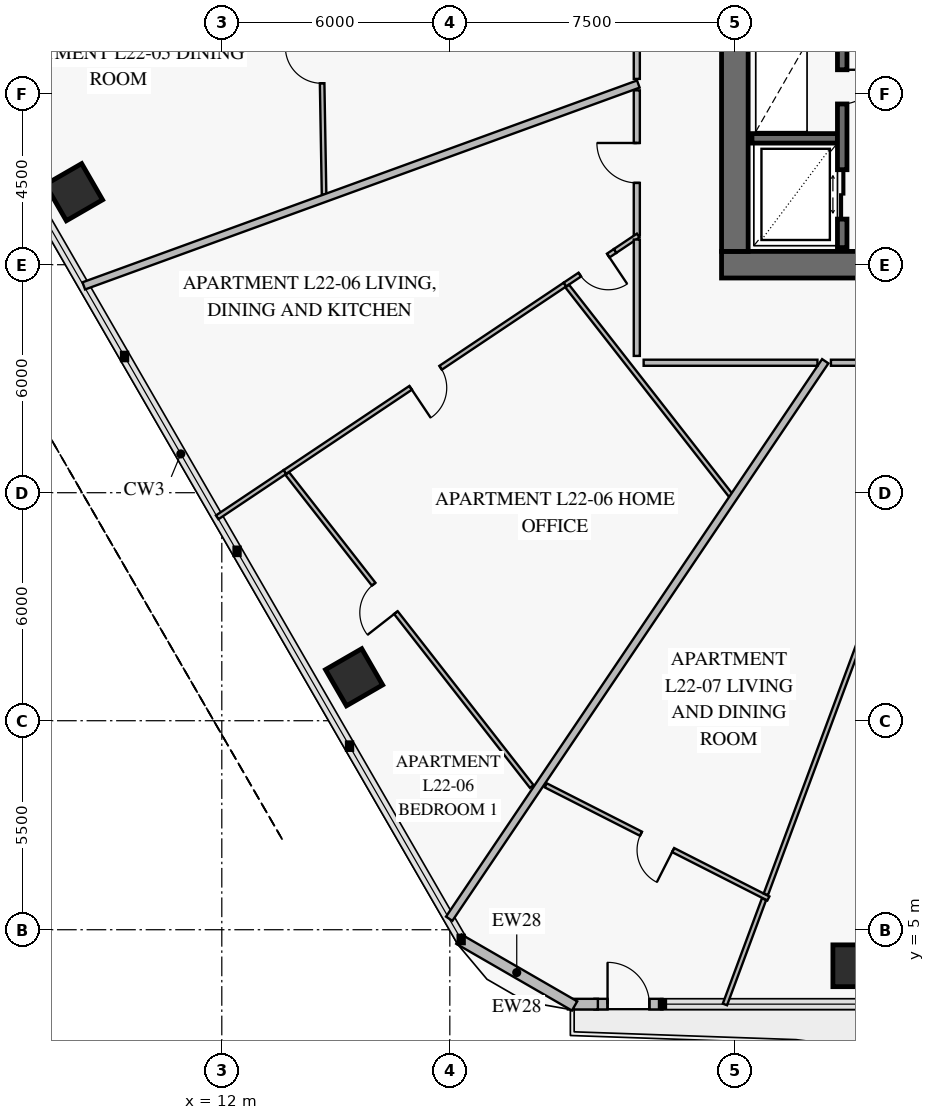
"""IFC4 building model, lengths in metres.
Left out: names, types, materials, properties, quantities, classifications, styles, units other than length and angle.
Written with IfcOpenShell. Run it as: python <this file> out.ifc"""

import sys

from ifc_helpers import new_model, si_unit, direction, frame, frame_2d, origin, origin_2d, place, context, subcontext, project, spatial, rectangle, extrude, element, fill, save


model = new_model("IFC4")
c1 = context("Model", 3, precision=1e-05, world=origin(), true_north=direction((0.0, 1.0)))
c2 = subcontext(c1, "Body", "Model", "MODEL_VIEW")
j1 = project(units=[si_unit("LENGTHUNIT", "METRE"), si_unit("PLANEANGLEUNIT", "RADIAN")], contexts=[c1])
p1 = place(None, origin())
s1 = spatial("IfcSite", under=j1, at=p1, CompositionType="ELEMENT")
p2 = place(p1, origin())
s2 = spatial("IfcBuilding", under=s1, at=p2, CompositionType="ELEMENT")
p3 = place(p2, frame((0.0, 0.0, 92.4)))
s3 = spatial("IfcBuildingStorey", under=s2, at=p3, CompositionType="ELEMENT", Elevation=92.4)
p4 = place(p3, frame((25.15, 22.5, 0.0), z_axis=(0.0, 0.0, 1.0), x_axis=(1.0, 0.0, 0.0)))
e1 = element("IfcWall", 1, at=p4, inside=s3, PredefinedType="SHEAR", context=c2, shape_type="SweptSolid", body=[
    extrude(rectangle(XDim=9.9, YDim=0.7, at=frame_2d((4.95, 0.0))), origin(), (0.0, 0.0, 1.0), 3.8),
])
p5 = place(p4, frame((4.25, 0.0, 0.0)))
e2 = element("IfcOpeningElement", 2, at=p5, cuts=e1, PredefinedType="OPENING", context=c2, shape_type="SweptSolid", body=[
    extrude(rectangle(XDim=1.5, YDim=2.15, at=frame_2d((0.75, 1.075))), frame((0.0, 0.362, 0.0), z_axis=(0.0, -1.0, 0.0), x_axis=(1.0, 0.0, 0.0)), (0.0, 0.0, 1.0), 0.724),
])
p6 = place(p3, frame((25.5, 22.85, 0.0), z_axis=(0.0, 0.0, 1.0), x_axis=(0.0, 1.0, 0.0)))
e3 = element("IfcWall", 3, at=p6, inside=s3, PredefinedType="SHEAR", context=c2, shape_type="SweptSolid", body=[
    extrude(rectangle(XDim=18.3, YDim=0.7, at=frame_2d((9.15, 0.0))), origin(), (0.0, 0.0, 1.0), 3.8),
])
p7 = place(p6, frame((8.9, 0.0, 0.0)))
e4 = element("IfcOpeningElement", 4, at=p7, cuts=e3, PredefinedType="OPENING", context=c2, shape_type="SweptSolid", body=[
    extrude(rectangle(XDim=1.1, YDim=2.15, at=frame_2d((0.55, 1.075))), frame((0.0, 0.362, 0.0), z_axis=(0.0, -1.0, 0.0), x_axis=(1.0, 0.0, 0.0)), (0.0, 0.0, 1.0), 0.724),
])
for number, where, z_axis, x_axis in (
    (5, (8.111, 24.408, 0.0), (0.0, 0.0, 1.0), (0.5, -0.866, 0.0)),
    (6, (15.481, 11.643, 0.0), (0.0, 0.0, 1.0), (0.5, -0.866, 0.0)),
    (7, (28.63, 4.052, 0.0), (0.0, 0.0, 1.0), (1.0, 0.0, 0.0)),
):
    element("IfcColumn", number, at=place(p3, frame(where, z_axis=z_axis, x_axis=x_axis)), inside=s3, PredefinedType="COLUMN", context=c2, shape_type="SweptSolid", body=[
        extrude(rectangle(XDim=1.1, YDim=1.1, at=origin_2d()), origin(), (0.0, 0.0, 1.0), 3.55),
    ])
p8 = place(p3, frame((23.595, 3.042, 0.0), z_axis=(0.0, 0.0, 1.0), x_axis=(-1.0, 0.0, 0.0)))
e8 = element("IfcWall", 8, at=p8, inside=s3, PredefinedType="SOLIDWALL", context=c2, shape_type="SweptSolid", body=[
    extrude(rectangle(XDim=1.79, YDim=0.28, at=frame_2d((0.895, 0.0))), origin(), (0.0, 0.0, 1.0), 3.55),
])
p9 = place(p8, frame((0.345, 0.0, 0.0)))
e9 = element("IfcOpeningElement", 9, at=p9, cuts=e8, PredefinedType="OPENING", context=c2, shape_type="SweptSolid", body=[
    extrude(rectangle(XDim=1.1, YDim=2.2, at=frame_2d((0.55, 1.1))), frame((0.0, 0.152, 0.0), z_axis=(0.0, -1.0, 0.0), x_axis=(1.0, 0.0, 0.0)), (0.0, 0.0, 1.0), 0.304),
])
p10 = place(p3, frame((21.896, 3.042, 0.0), z_axis=(0.0, 0.0, 1.0), x_axis=(-1.0, 0.0, 0.0)))
e10 = element("IfcWall", 10, at=p10, inside=s3, PredefinedType="SOLIDWALL", context=c2, shape_type="SweptSolid", body=[
    extrude(rectangle(XDim=0.79, YDim=0.28, at=frame_2d((0.395, 0.0))), origin(), (0.0, 0.0, 1.0), 3.55),
])
p11 = place(p3, frame((21.283, 2.994, 0.0), z_axis=(0.0, 0.0, 1.0), x_axis=(-0.866007452331, 0.500031091541, 0.0)))
e11 = element("IfcWall", 11, at=p11, inside=s3, PredefinedType="SOLIDWALL", context=c2, shape_type="SweptSolid", body=[
    extrude(rectangle(XDim=3.515, YDim=0.28, at=frame_2d((1.757, 0.0))), origin(), (0.0, 0.0, 1.0), 3.55),
])
p12 = place(p3, frame((25.95, 25.825, 0.0), z_axis=(0.0, 0.0, 1.0), x_axis=(1.0, 0.0, 0.0)))
e12 = element("IfcWall", 12, at=p12, inside=s3, PredefinedType="SOLIDWALL", context=c2, shape_type="SweptSolid", body=[
    extrude(rectangle(XDim=2.25, YDim=0.25, at=frame_2d((1.125, 0.0))), origin(), (0.0, 0.0, 1.0), 3.8),
])
p13 = place(p3, frame((28.325, 22.95, 0.0), z_axis=(0.0, 0.0, 1.0), x_axis=(0.0, 1.0, 0.0)))
e13 = element("IfcWall", 13, at=p13, inside=s3, PredefinedType="SOLIDWALL", context=c2, shape_type="SweptSolid", body=[
    extrude(rectangle(XDim=8.2, YDim=0.25, at=frame_2d((4.1, 0.0))), origin(), (0.0, 0.0, 1.0), 3.8),
])
p14 = place(p13, frame((0.75, 0.0, 0.0)))
e14 = element("IfcOpeningElement", 14, at=p14, cuts=e13, PredefinedType="OPENING", context=c2, shape_type="SweptSolid", body=[
    extrude(rectangle(XDim=1.3, YDim=2.3, at=frame_2d((0.65, 1.15))), frame((0.0, 0.137, 0.0), z_axis=(0.0, -1.0, 0.0), x_axis=(1.0, 0.0, 0.0)), (0.0, 0.0, 1.0), 0.274),
])
p15 = place(p13, frame((3.78, 0.0, 0.0)))
e15 = element("IfcOpeningElement", 15, at=p15, cuts=e13, PredefinedType="OPENING", context=c2, shape_type="SweptSolid", body=[
    extrude(rectangle(XDim=0.9, YDim=2.1, at=frame_2d((0.45, 1.05))), frame((0.0, 0.137, 0.0), z_axis=(0.0, -1.0, 0.0), x_axis=(1.0, 0.0, 0.0)), (0.0, 0.0, 1.0), 0.274),
])
p16 = place(p13, frame((6.5, 0.0, 0.0)))
e16 = element("IfcOpeningElement", 16, at=p16, cuts=e13, PredefinedType="OPENING", context=c2, shape_type="SweptSolid", body=[
    extrude(rectangle(XDim=0.9, YDim=2.1, at=frame_2d((0.45, 1.05))), frame((0.0, 0.137, 0.0), z_axis=(0.0, -1.0, 0.0), x_axis=(1.0, 0.0, 0.0)), (0.0, 0.0, 1.0), 0.274),
])
p17 = place(p3, frame((14.533, 33.391, 0.0), z_axis=(0.0, 0.0, 1.0), x_axis=(0.017438423518, -0.999847939131, 0.0)))
e17 = element("IfcWall", 17, at=p17, inside=s3, PredefinedType="PARTITIONING", context=c2, shape_type="SweptSolid", body=[
    extrude(rectangle(XDim=9.044, YDim=0.12, at=frame_2d((4.522, 0.0))), origin(), (0.0, 0.0, 1.0), 2.85),
])
p18 = place(p17, frame((0.885, 0.0, 0.0)))
e18 = element("IfcOpeningElement", 18, at=p18, cuts=e17, PredefinedType="OPENING", context=c2, shape_type="SweptSolid", body=[
    extrude(rectangle(XDim=0.95, YDim=2.1, at=frame_2d((0.475, 1.05))), frame((0.0, 0.072, 0.0), z_axis=(0.0, -1.0, 0.0), x_axis=(1.0, 0.0, 0.0)), (0.0, 0.0, 1.0), 0.144),
])
p19 = place(p17, frame((5.167, 0.0, 0.0)))
e19 = element("IfcOpeningElement", 19, at=p19, cuts=e17, PredefinedType="OPENING", context=c2, shape_type="SweptSolid", body=[
    extrude(rectangle(XDim=0.95, YDim=2.1, at=frame_2d((0.475, 1.05))), frame((0.0, 0.072, 0.0), z_axis=(0.0, -1.0, 0.0), x_axis=(1.0, 0.0, 0.0)), (0.0, 0.0, 1.0), 0.144),
])
p20 = place(p3, frame((22.92, 32.766, 0.0), z_axis=(0.0, 0.0, 1.0), x_axis=(0.0, -1.0, 0.0)))
e20 = element("IfcWall", 20, at=p20, inside=s3, PredefinedType="PARTITIONING", context=c2, shape_type="SweptSolid", body=[
    extrude(rectangle(XDim=5.377, YDim=0.16, at=frame_2d((2.688, 0.0))), origin(), (0.0, 0.0, 1.0), 2.85),
])
p21 = place(p20, frame((2.163, 0.0, 0.0)))
e21 = element("IfcOpeningElement", 21, at=p21, cuts=e20, PredefinedType="OPENING", context=c2, shape_type="SweptSolid", body=[
    extrude(rectangle(XDim=1.05, YDim=2.15, at=frame_2d((0.525, 1.075))), frame((0.0, 0.092, 0.0), z_axis=(0.0, -1.0, 0.0), x_axis=(1.0, 0.0, 0.0)), (0.0, 0.0, 1.0), 0.184),
])
p22 = place(p3, frame((22.35, 22.862, 0.0), z_axis=(0.0, 0.0, 1.0), x_axis=(-0.831058391016, -0.556185176647, 0.0)))
e22 = element("IfcWall", 22, at=p22, inside=s3, PredefinedType="PARTITIONING", context=c2, shape_type="SweptSolid", body=[
    extrude(rectangle(XDim=1.593, YDim=0.12, at=frame_2d((0.796, 0.0))), origin(), (0.0, 0.0, 1.0), 3.55),
])
p23 = place(p22, frame((0.219, 0.0, 0.0)))
e23 = element("IfcOpeningElement", 23, at=p23, cuts=e22, PredefinedType="OPENING", context=c2, shape_type="SweptSolid", body=[
    extrude(rectangle(XDim=0.9, YDim=2.1, at=frame_2d((0.45, 1.05))), frame((0.0, 0.072, 0.0), z_axis=(0.0, -1.0, 0.0), x_axis=(1.0, 0.0, 0.0)), (0.0, 0.0, 1.0), 0.144),
])
p24 = place(p3, frame((21.027, 21.976, 0.0), z_axis=(0.0, 0.0, 1.0), x_axis=(-0.830972753707, -0.556313115607, 0.0)))
e24 = element("IfcWall", 24, at=p24, inside=s3, PredefinedType="PARTITIONING", context=c2, shape_type="SweptSolid", body=[
    extrude(rectangle(XDim=8.867, YDim=0.12, at=frame_2d((4.433, 0.0))), origin(), (0.0, 0.0, 1.0), 3.1),
])
p25 = place(p24, frame((3.933, 0.0, 0.0)))
e25 = element("IfcOpeningElement", 25, at=p25, cuts=e24, PredefinedType="OPENING", context=c2, shape_type="SweptSolid", body=[
    extrude(rectangle(XDim=0.95, YDim=2.1, at=frame_2d((0.475, 1.05))), frame((0.0, 0.072, 0.0), z_axis=(0.0, -1.0, 0.0), x_axis=(1.0, 0.0, 0.0)), (0.0, 0.0, 1.0), 0.144),
])
p26 = place(p3, frame((13.722, 17.004, 0.0), z_axis=(0.0, 0.0, 1.0), x_axis=(0.615661723456, -0.788010559746, 0.0)))
e26 = element("IfcWall", 26, at=p26, inside=s3, PredefinedType="PARTITIONING", context=c2, shape_type="SweptSolid", body=[
    extrude(rectangle(XDim=10.45, YDim=0.12, at=frame_2d((5.225, 0.0))), origin(), (0.0, 0.0, 1.0), 2.8),
])
p27 = place(p26, frame((3.695, 0.0, 0.0)))
e27 = element("IfcOpeningElement", 27, at=p27, cuts=e26, PredefinedType="OPENING", context=c2, shape_type="SweptSolid", body=[
    extrude(rectangle(XDim=0.95, YDim=2.1, at=frame_2d((0.475, 1.05))), frame((0.0, 0.072, 0.0), z_axis=(0.0, -1.0, 0.0), x_axis=(1.0, 0.0, 0.0)), (0.0, 0.0, 1.0), 0.144),
])
p28 = place(p3, frame((22.92, 27.088, 0.0), z_axis=(0.0, 0.0, 1.0), x_axis=(0.0, -1.0, 0.0)))
e28 = element("IfcWall", 28, at=p28, inside=s3, PredefinedType="PARTITIONING", context=c2, shape_type="SweptSolid", body=[
    extrude(rectangle(XDim=3.82, YDim=0.16, at=frame_2d((1.91, 0.0))), origin(), (0.0, 0.0, 1.0), 3.55),
])
p29 = place(p28, frame((1.385, 0.0, 0.0)))
e29 = element("IfcOpeningElement", 29, at=p29, cuts=e28, PredefinedType="OPENING", context=c2, shape_type="SweptSolid", body=[
    extrude(rectangle(XDim=1.05, YDim=2.15, at=frame_2d((0.525, 1.075))), frame((0.0, 0.092, 0.0), z_axis=(0.0, -1.0, 0.0), x_axis=(1.0, 0.0, 0.0)), (0.0, 0.0, 1.0), 0.184),
])
p30 = place(p3, frame((20.524, 8.8, 0.0), z_axis=(0.0, 0.0, 1.0), x_axis=(0.891487645156, -0.453045007185, 0.0)))
e30 = element("IfcWall", 30, at=p30, inside=s3, PredefinedType="PARTITIONING", context=c2, shape_type="SweptSolid", body=[
    extrude(rectangle(XDim=6.571, YDim=0.12, at=frame_2d((3.285, 0.0))), origin(), (0.0, 0.0, 1.0), 2.8),
])
p31 = place(p30, frame((2.81, 0.0, 0.0)))
e31 = element("IfcOpeningElement", 31, at=p31, cuts=e30, PredefinedType="OPENING", context=c2, shape_type="SweptSolid", body=[
    extrude(rectangle(XDim=0.95, YDim=2.1, at=frame_2d((0.475, 1.05))), frame((0.0, 0.072, 0.0), z_axis=(0.0, -1.0, 0.0), x_axis=(1.0, 0.0, 0.0)), (0.0, 0.0, 1.0), 0.144),
])
p32 = place(p3, frame((28.028, 19.92, 0.0), z_axis=(0.0, 0.0, 1.0), x_axis=(1.0, 0.0, 0.0)))
e32 = element("IfcWall", 32, at=p32, inside=s3, PredefinedType="PARTITIONING", context=c2, shape_type="SweptSolid", body=[
    extrude(rectangle(XDim=3.463, YDim=0.16, at=frame_2d((1.731, 0.0))), origin(), (0.0, 0.0, 1.0), 3.55),
])
p33 = place(p32, frame((1.206, 0.0, 0.0)))
e33 = element("IfcOpeningElement", 33, at=p33, cuts=e32, PredefinedType="OPENING", context=c2, shape_type="SweptSolid", body=[
    extrude(rectangle(XDim=1.05, YDim=2.15, at=frame_2d((0.525, 1.075))), frame((0.0, 0.092, 0.0), z_axis=(0.0, -1.0, 0.0), x_axis=(1.0, 0.0, 0.0)), (0.0, 0.0, 1.0), 0.184),
])
p34 = place(p3, frame((22.96, 27.254, 0.0), z_axis=(0.0, 0.0, 1.0), x_axis=(-0.939691473543, -0.342023295333, 0.0)))
e34 = element("IfcWall", 34, at=p34, inside=s3, PredefinedType="PARTITIONING", context=c2, shape_type="SweptSolid", body=[
    extrude(rectangle(XDim=15.528, YDim=0.2, at=frame_2d((7.764, 0.0))), origin(), (0.0, 0.0, 1.0), 2.8),
])
p35 = place(p3, frame((22.956, 23.268, 0.0), z_axis=(0.0, 0.0, 1.0), x_axis=(-0.830915468449, -0.556398673877, 0.0)))
e35 = element("IfcWall", 35, at=p35, inside=s3, PredefinedType="PARTITIONING", context=c2, shape_type="SweptSolid", body=[
    extrude(rectangle(XDim=0.729, YDim=0.12, at=frame_2d((0.365, 0.0))), origin(), (0.0, 0.0, 1.0), 3.55),
])
p36 = place(p3, frame((13.659, 17.044, 0.0), z_axis=(0.0, 0.0, 1.0), x_axis=(-0.830943875416, -0.556356249096, 0.0)))
e36 = element("IfcWall", 36, at=p36, inside=s3, PredefinedType="PARTITIONING", context=c2, shape_type="SweptSolid", body=[
    extrude(rectangle(XDim=2.142, YDim=0.12, at=frame_2d((1.071, 0.0))), origin(), (0.0, 0.0, 1.0), 2.8),
])
p37 = place(p3, frame((21.089, 21.936, 0.0), z_axis=(0.0, 0.0, 1.0), x_axis=(0.615669714857, -0.78800431611, 0.0)))
e37 = element("IfcWall", 37, at=p37, inside=s3, PredefinedType="PARTITIONING", context=c2, shape_type="SweptSolid", body=[
    extrude(rectangle(XDim=7.012, YDim=0.12, at=frame_2d((3.506, 0.0))), origin(), (0.0, 0.0, 1.0), 2.85),
])
p38 = place(p3, frame((27.879, 19.96, 0.0), z_axis=(0.0, 0.0, 1.0), x_axis=(-0.559197020648, -0.829034795469, 0.0)))
e38 = element("IfcWall", 38, at=p38, inside=s3, PredefinedType="PARTITIONING", context=c2, shape_type="SweptSolid", body=[
    extrude(rectangle(XDim=17.696, YDim=0.2, at=frame_2d((8.848, 0.0))), origin(), (0.0, 0.0, 1.0), 2.8),
])
p39 = place(p3, frame((29.848, 15.442, 0.0), z_axis=(0.0, 0.0, 1.0), x_axis=(-0.348233662926, -0.937407763999, 0.0)))
e39 = element("IfcWall", 39, at=p39, inside=s3, PredefinedType="PARTITIONING", context=c2, shape_type="SweptSolid", body=[
    extrude(rectangle(XDim=10.144, YDim=0.12, at=frame_2d((5.072, 0.0))), origin(), (0.0, 0.0, 1.0), 3.1),
])
p40 = place(p3, frame((26.268, 5.804, 0.0), z_axis=(0.0, 0.0, 1.0), x_axis=(-0.348234227569, -0.937407554242, 0.0)))
e40 = element("IfcWall", 40, at=p40, inside=s3, PredefinedType="PARTITIONING", context=c2, shape_type="SweptSolid", body=[
    extrude(rectangle(XDim=2.956, YDim=0.12, at=frame_2d((1.478, 0.0))), origin(), (0.0, 0.0, 1.0), 2.8),
])
p41 = place(p3, frame((23.1, 19.92, 0.0), z_axis=(0.0, 0.0, 1.0), x_axis=(1.0, 0.0, 0.0)))
e41 = element("IfcWall", 41, at=p41, inside=s3, PredefinedType="PARTITIONING", context=c2, shape_type="SweptSolid", body=[
    extrude(rectangle(XDim=4.573, YDim=0.16, at=frame_2d((2.287, 0.0))), origin(), (0.0, 0.0, 1.0), 2.85),
])
p42 = place(p3, frame((22.92, 23.162, 0.0), z_axis=(0.0, 0.0, 1.0), x_axis=(0.0, -1.0, 0.0)))
e42 = element("IfcWall", 42, at=p42, inside=s3, PredefinedType="PARTITIONING", context=c2, shape_type="SweptSolid", body=[
    extrude(rectangle(XDim=3.062, YDim=0.16, at=frame_2d((1.531, 0.0))), origin(), (0.0, 0.0, 1.0), 3.55),
])
p43 = place(p9, frame((1.1, 0.0, 0.0), z_axis=(0.0, 0.0, 1.0), x_axis=(-1.0, 0.0, 0.0)))
e43 = element("IfcDoor", 43, at=p43, inside=s3, OperationType="SINGLE_SWING_LEFT", PredefinedType="DOOR", context=c2, shape_type="SweptSolid", body=[
    extrude(rectangle(XDim=1.1, YDim=2.2, at=frame_2d((0.55, 1.1))), frame((0.0, 0.025, 0.0), z_axis=(0.0, -1.0, 0.0), x_axis=(1.0, 0.0, 0.0)), (0.0, 0.0, 1.0), 0.05),
])
fill(e9, e43)
p44 = place(p14, frame((1.3, 0.0, 0.0), z_axis=(0.0, 0.0, 1.0), x_axis=(-1.0, 0.0, 0.0)))
e44 = element("IfcDoor", 44, at=p44, inside=s3, OperationType="DOUBLE_DOOR_SLIDING", PredefinedType="DOOR", context=c2, shape_type="SweptSolid", body=[
    extrude(rectangle(XDim=1.3, YDim=2.3, at=frame_2d((0.65, 1.15))), frame((0.0, 0.025, 0.0), z_axis=(0.0, -1.0, 0.0), x_axis=(1.0, 0.0, 0.0)), (0.0, 0.0, 1.0), 0.05),
])
fill(e14, e44)
p45 = place(p15, frame((0.9, 0.0, 0.0), z_axis=(0.0, 0.0, 1.0), x_axis=(-1.0, 0.0, 0.0)))
e45 = element("IfcDoor", 45, at=p45, inside=s3, OperationType="SINGLE_SWING_LEFT", PredefinedType="DOOR", context=c2, shape_type="SweptSolid", body=[
    extrude(rectangle(XDim=0.9, YDim=2.1, at=frame_2d((0.45, 1.05))), frame((0.0, 0.025, 0.0), z_axis=(0.0, -1.0, 0.0), x_axis=(1.0, 0.0, 0.0)), (0.0, 0.0, 1.0), 0.05),
])
fill(e15, e45)
p46 = place(p19, frame((0.95, 0.0, 0.0), z_axis=(0.0, 0.0, 1.0), x_axis=(-1.0, 0.0, 0.0)))
e46 = element("IfcDoor", 46, at=p46, inside=s3, OperationType="SINGLE_SWING_RIGHT", PredefinedType="DOOR", context=c2, shape_type="SweptSolid", body=[
    extrude(rectangle(XDim=0.95, YDim=2.1, at=frame_2d((0.475, 1.05))), frame((0.0, 0.025, 0.0), z_axis=(0.0, -1.0, 0.0), x_axis=(1.0, 0.0, 0.0)), (0.0, 0.0, 1.0), 0.05),
])
fill(e19, e46)
p47 = place(p23, origin())
e47 = element("IfcDoor", 47, at=p47, inside=s3, OperationType="SINGLE_SWING_LEFT", PredefinedType="DOOR", context=c2, shape_type="SweptSolid", body=[
    extrude(rectangle(XDim=0.9, YDim=2.1, at=frame_2d((0.45, 1.05))), frame((0.0, 0.025, 0.0), z_axis=(0.0, -1.0, 0.0), x_axis=(1.0, 0.0, 0.0)), (0.0, 0.0, 1.0), 0.05),
])
fill(e23, e47)
p48 = place(p25, origin())
e48 = element("IfcDoor", 48, at=p48, inside=s3, OperationType="SINGLE_SWING_RIGHT", PredefinedType="DOOR", context=c2, shape_type="SweptSolid", body=[
    extrude(rectangle(XDim=0.95, YDim=2.1, at=frame_2d((0.475, 1.05))), frame((0.0, 0.025, 0.0), z_axis=(0.0, -1.0, 0.0), x_axis=(1.0, 0.0, 0.0)), (0.0, 0.0, 1.0), 0.05),
])
fill(e25, e48)
p49 = place(p27, frame((0.95, 0.0, 0.0), z_axis=(0.0, 0.0, 1.0), x_axis=(-1.0, 0.0, 0.0)))
e49 = element("IfcDoor", 49, at=p49, inside=s3, OperationType="SINGLE_SWING_LEFT", PredefinedType="DOOR", context=c2, shape_type="SweptSolid", body=[
    extrude(rectangle(XDim=0.95, YDim=2.1, at=frame_2d((0.475, 1.05))), frame((0.0, 0.025, 0.0), z_axis=(0.0, -1.0, 0.0), x_axis=(1.0, 0.0, 0.0)), (0.0, 0.0, 1.0), 0.05),
])
fill(e27, e49)
p50 = place(p29, frame((1.05, 0.0, 0.0), z_axis=(0.0, 0.0, 1.0), x_axis=(-1.0, 0.0, 0.0)))
e50 = element("IfcDoor", 50, at=p50, inside=s3, OperationType="SINGLE_SWING_RIGHT", PredefinedType="DOOR", context=c2, shape_type="SweptSolid", body=[
    extrude(rectangle(XDim=1.05, YDim=2.15, at=frame_2d((0.525, 1.075))), frame((0.0, 0.025, 0.0), z_axis=(0.0, -1.0, 0.0), x_axis=(1.0, 0.0, 0.0)), (0.0, 0.0, 1.0), 0.05),
])
fill(e29, e50)
p51 = place(p31, frame((0.95, 0.0, 0.0), z_axis=(0.0, 0.0, 1.0), x_axis=(-1.0, 0.0, 0.0)))
e51 = element("IfcDoor", 51, at=p51, inside=s3, OperationType="SINGLE_SWING_LEFT", PredefinedType="DOOR", context=c2, shape_type="SweptSolid", body=[
    extrude(rectangle(XDim=0.95, YDim=2.1, at=frame_2d((0.475, 1.05))), frame((0.0, 0.025, 0.0), z_axis=(0.0, -1.0, 0.0), x_axis=(1.0, 0.0, 0.0)), (0.0, 0.0, 1.0), 0.05),
])
fill(e31, e51)
save(model, sys.argv[1])
